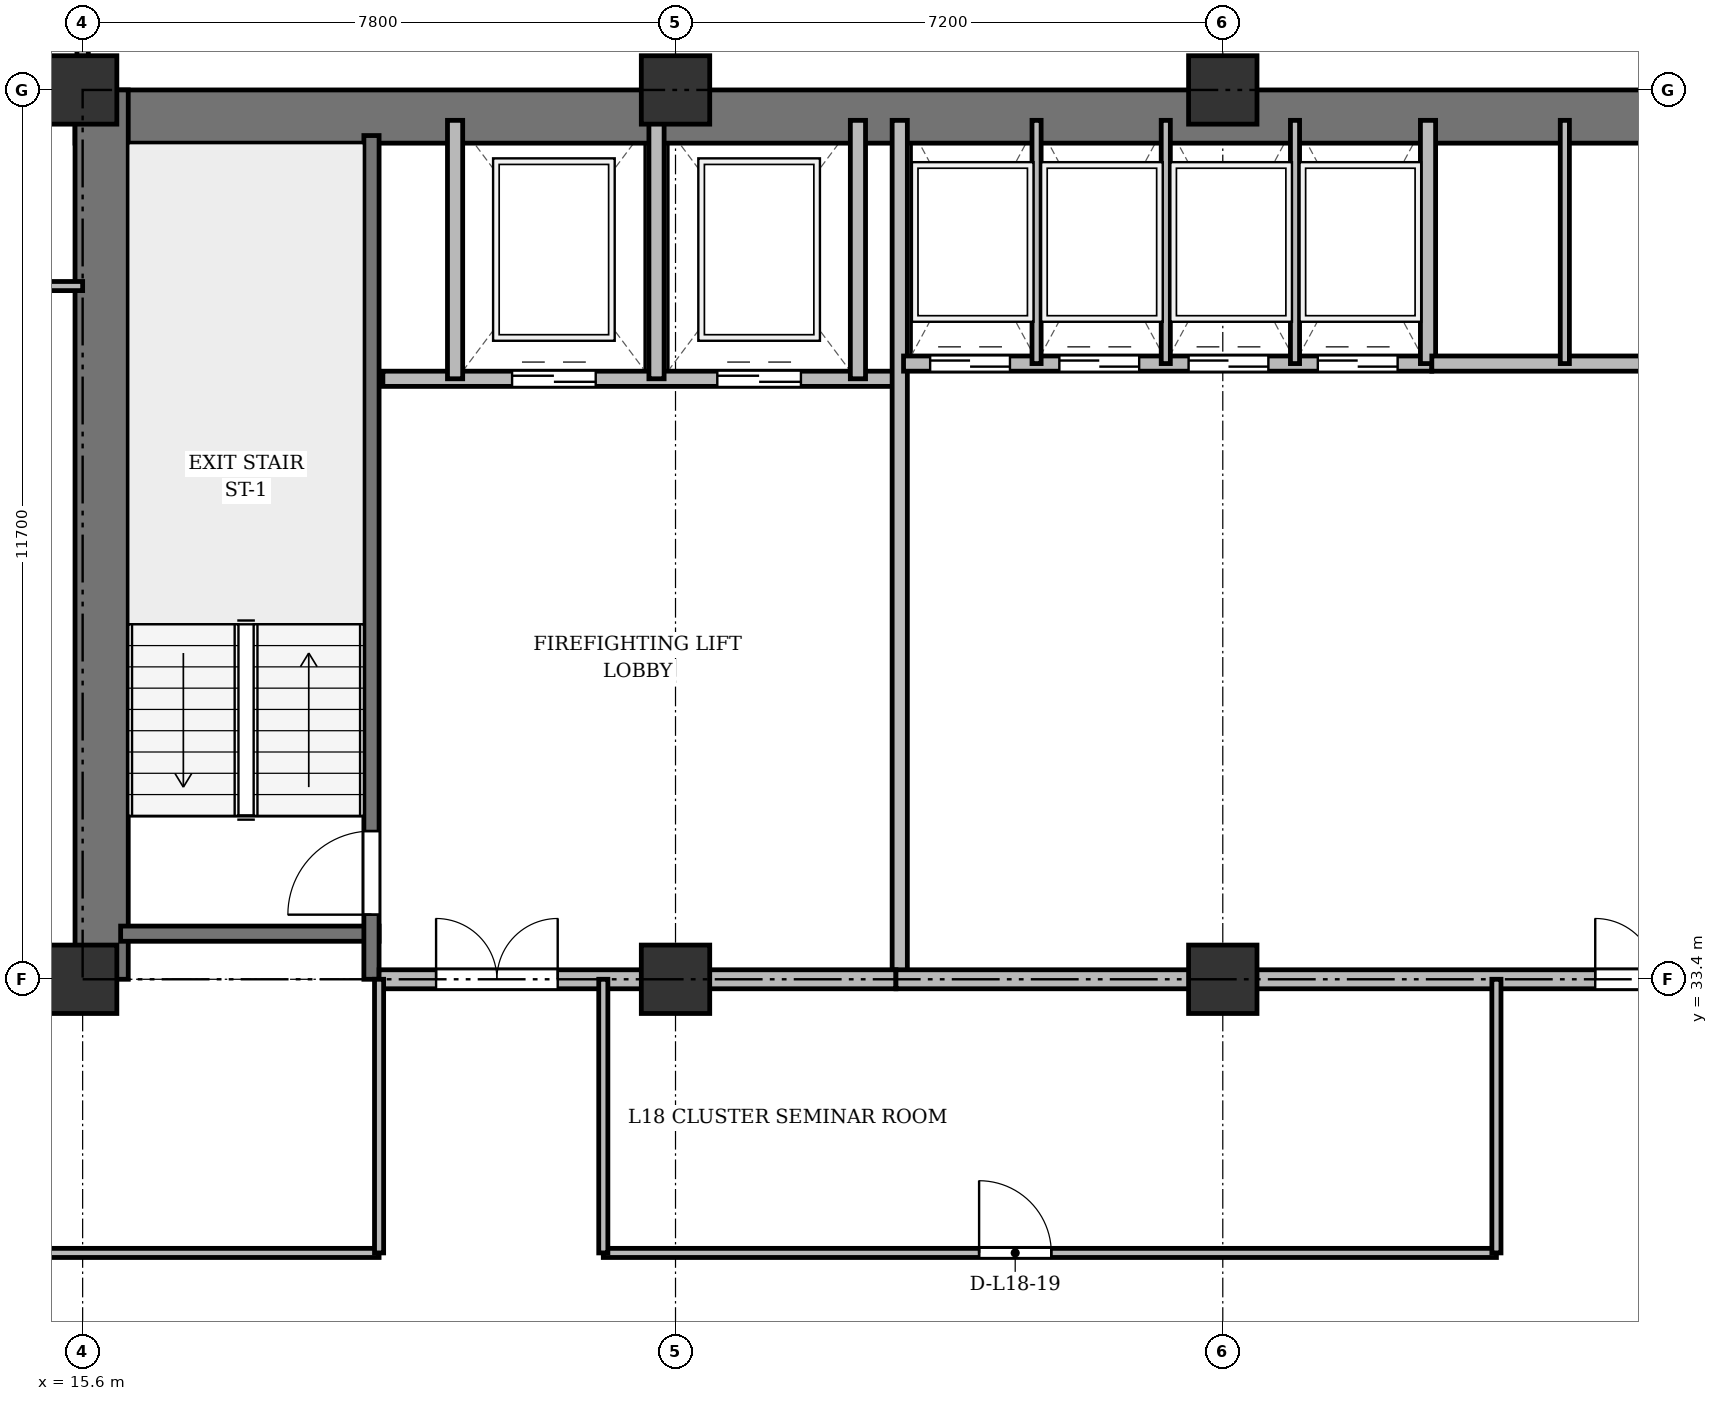
"""IFC4 building model, lengths in metres.
Left out: names, types, materials, properties, quantities, classifications, styles, units other than length and angle.
Written with IfcOpenShell. Run it as: python <this file> out.ifc"""

import sys

from ifc_helpers import new_model, si_unit, direction, frame, frame_2d, origin, origin_2d, place, context, subcontext, project, spatial, rectangle, extrude, source, transform, mapped, element, fill, save


model = new_model("IFC4")
c1 = context("Model", 3, precision=1e-05, world=origin(), true_north=direction((0.0, 1.0)))
c2 = subcontext(c1, "Body", "Model", "MODEL_VIEW")
j1 = project(units=[si_unit("LENGTHUNIT", "METRE"), si_unit("PLANEANGLEUNIT", "RADIAN")], contexts=[c1])
p1 = place(None, origin())
s1 = spatial("IfcSite", under=j1, at=p1, CompositionType="ELEMENT")
p2 = place(p1, origin())
s2 = spatial("IfcBuilding", under=s1, at=p2, CompositionType="ELEMENT")
p3 = place(p2, frame((0.0, 0.0, 70.3)))
s3 = spatial("IfcBuildingStorey", under=s2, at=p3, CompositionType="ELEMENT", Elevation=70.3)
m1 = source(origin(), c2, "Body", "SweptSolid", [
    extrude(rectangle(XDim=0.9, YDim=0.9, at=origin_2d()), origin(), (0.0, 0.0, 1.0), 3.6),
])
for number, where, z_axis, x_axis in (
    (1, (15.6, 33.4, 0.0), (0.0, 0.0, 1.0), (1.0, 0.0, 0.0)),
    (2, (15.6, 45.1, 0.0), (0.0, 0.0, 1.0), (1.0, 0.0, 0.0)),
    (3, (23.4, 33.4, 0.0), (0.0, 0.0, 1.0), (1.0, 0.0, 0.0)),
    (4, (23.4, 45.1, 0.0), (0.0, 0.0, 1.0), (1.0, 0.0, 0.0)),
    (5, (30.6, 33.4, 0.0), (0.0, 0.0, 1.0), (1.0, 0.0, 0.0)),
    (6, (30.6, 45.1, 0.0), (0.0, 0.0, 1.0), (1.0, 0.0, 0.0)),
):
    element("IfcColumn", number, at=place(p3, frame(where, z_axis=z_axis, x_axis=x_axis)), inside=s3, PredefinedType="COLUMN", context=c2, shape_type="MappedRepresentation", body=[
        mapped(m1, transform((0.0, 0.0, 0.0), x_axis=(1.0, 0.0, 0.0), y_axis=(0.0, 1.0, 0.0), z_axis=(0.0, 0.0, 1.0), scale=1.0)),
    ])
p4 = place(p3, frame((15.5, 44.75, 0.0), z_axis=(0.0, 0.0, 1.0), x_axis=(1.0, 0.0, 0.0)))
e7 = element("IfcWall", 7, at=p4, inside=s3, PredefinedType="SHEAR", context=c2, shape_type="SweptSolid", body=[
    extrude(rectangle(XDim=43.4, YDim=0.7, at=frame_2d((21.7, 0.0))), origin(), (0.0, 0.0, 1.0), 3.22),
])
p5 = place(p3, frame((15.85, 33.4, 0.0), z_axis=(0.0, 0.0, 1.0), x_axis=(0.0, 1.0, 0.0)))
e8 = element("IfcWall", 8, at=p5, inside=s3, PredefinedType="SHEAR", context=c2, shape_type="SweptSolid", body=[
    extrude(rectangle(XDim=11.7, YDim=0.7, at=frame_2d((5.85, 0.0))), origin(), (0.0, 0.0, 1.0), 3.22),
])
p6 = place(p3, frame((16.1, 34.0, 0.0), z_axis=(0.0, 0.0, 1.0), x_axis=(1.0, 0.0, 0.0)))
e9 = element("IfcWall", 9, at=p6, inside=s3, PredefinedType="SHEAR", context=c2, shape_type="SweptSolid", body=[
    extrude(rectangle(XDim=3.4, YDim=0.2, at=frame_2d((1.7, 0.0))), origin(), (0.0, 0.0, 1.0), 3.22),
])
p7 = place(p3, frame((19.4, 33.4, 0.0), z_axis=(0.0, 0.0, 1.0), x_axis=(0.0, 1.0, 0.0)))
e10 = element("IfcWall", 10, at=p7, inside=s3, PredefinedType="SHEAR", context=c2, shape_type="SweptSolid", body=[
    extrude(rectangle(XDim=11.1, YDim=0.2, at=frame_2d((5.55, 0.0))), origin(), (0.0, 0.0, 1.0), 3.22),
])
p8 = place(p7, frame((0.85, 0.0, 0.0)))
e11 = element("IfcOpeningElement", 11, at=p8, cuts=e10, PredefinedType="OPENING", context=c2, shape_type="SweptSolid", body=[
    extrude(rectangle(XDim=1.1, YDim=2.15, at=frame_2d((0.55, 1.075))), frame((0.0, 0.11, 0.0), z_axis=(0.0, -1.0, 0.0), x_axis=(1.0, 0.0, 0.0)), (0.0, 0.0, 1.0), 0.22),
])
p9 = place(p3, frame((19.55, 41.3, 0.0), z_axis=(0.0, 0.0, 1.0), x_axis=(1.0, 0.0, 0.0)))
e12 = element("IfcWall", 12, at=p9, inside=s3, PredefinedType="SOLIDWALL", context=c2, shape_type="SweptSolid", body=[
    extrude(rectangle(XDim=6.75, YDim=0.2, at=frame_2d((3.375, 0.0))), origin(), (0.0, 0.0, 1.0), 3.22),
])
p10 = place(p9, frame((1.7, 0.0, 0.0)))
e13 = element("IfcOpeningElement", 13, at=p10, cuts=e12, PredefinedType="OPENING", context=c2, shape_type="SweptSolid", body=[
    extrude(rectangle(XDim=1.1, YDim=2.15, at=frame_2d((0.55, 1.075))), frame((0.0, 0.11, 0.0), z_axis=(0.0, -1.0, 0.0), x_axis=(1.0, 0.0, 0.0)), (0.0, 0.0, 1.0), 0.22),
])
p11 = place(p9, frame((4.4, 0.0, 0.0)))
e14 = element("IfcOpeningElement", 14, at=p11, cuts=e12, PredefinedType="OPENING", context=c2, shape_type="SweptSolid", body=[
    extrude(rectangle(XDim=1.1, YDim=2.15, at=frame_2d((0.55, 1.075))), frame((0.0, 0.11, 0.0), z_axis=(0.0, -1.0, 0.0), x_axis=(1.0, 0.0, 0.0)), (0.0, 0.0, 1.0), 0.22),
])
for number, where, z_axis, x_axis in (
    (15, (20.5, 41.3, 0.0), (0.0, 0.0, 1.0), (0.0, 1.0, 0.0)),
    (16, (23.15, 41.3, 0.0), (0.0, 0.0, 1.0), (0.0, 1.0, 0.0)),
    (17, (25.8, 41.3, 0.0), (0.0, 0.0, 1.0), (0.0, 1.0, 0.0)),
):
    element("IfcWall", number, at=place(p3, frame(where, z_axis=z_axis, x_axis=x_axis)), inside=s3, PredefinedType="SOLIDWALL", context=c2, shape_type="SweptSolid", body=[
        extrude(rectangle(XDim=3.4, YDim=0.2, at=frame_2d((1.7, 0.0))), origin(), (0.0, 0.0, 1.0), 3.22),
    ])
p12 = place(p3, frame((26.35, 33.4, 0.0), z_axis=(0.0, 0.0, 1.0), x_axis=(0.0, 1.0, 0.0)))
e18 = element("IfcWall", 18, at=p12, inside=s3, PredefinedType="SOLIDWALL", context=c2, shape_type="SweptSolid", body=[
    extrude(rectangle(XDim=11.3, YDim=0.2, at=frame_2d((5.65, 0.0))), origin(), (0.0, 0.0, 1.0), 2.57),
])
p13 = place(p3, frame((19.5, 33.4, 0.0), z_axis=(0.0, 0.0, 1.0), x_axis=(1.0, 0.0, 0.0)))
e19 = element("IfcWall", 19, at=p13, inside=s3, PredefinedType="PARTITIONING", context=c2, shape_type="SweptSolid", body=[
    extrude(rectangle(XDim=6.8, YDim=0.25, at=frame_2d((3.4, 0.0))), origin(), (0.0, 0.0, 1.0), 2.57),
])
p14 = place(p13, frame((0.75, 0.0, 0.0)))
e20 = element("IfcOpeningElement", 20, at=p14, cuts=e19, PredefinedType="OPENING", context=c2, shape_type="SweptSolid", body=[
    extrude(rectangle(XDim=1.6, YDim=2.2, at=frame_2d((0.8, 1.1))), frame((0.0, 0.135, 0.0), z_axis=(0.0, -1.0, 0.0), x_axis=(1.0, 0.0, 0.0)), (0.0, 0.0, 1.0), 0.27),
])
p15 = place(p3, frame((26.4, 41.5, 0.0), z_axis=(0.0, 0.0, 1.0), x_axis=(1.0, 0.0, 0.0)))
e21 = element("IfcWall", 21, at=p15, inside=s3, PredefinedType="SOLIDWALL", context=c2, shape_type="SweptSolid", body=[
    extrude(rectangle(XDim=6.95, YDim=0.2, at=frame_2d((3.475, 0.0))), origin(), (0.0, 0.0, 1.0), 3.22),
])
p16 = place(p15, frame((0.35, 0.0, 0.0)))
e22 = element("IfcOpeningElement", 22, at=p16, cuts=e21, PredefinedType="OPENING", context=c2, shape_type="SweptSolid", body=[
    extrude(rectangle(XDim=1.05, YDim=2.15, at=frame_2d((0.525, 1.075))), frame((0.0, 0.11, 0.0), z_axis=(0.0, -1.0, 0.0), x_axis=(1.0, 0.0, 0.0)), (0.0, 0.0, 1.0), 0.22),
])
p17 = place(p15, frame((2.05, 0.0, 0.0)))
e23 = element("IfcOpeningElement", 23, at=p17, cuts=e21, PredefinedType="OPENING", context=c2, shape_type="SweptSolid", body=[
    extrude(rectangle(XDim=1.05, YDim=2.15, at=frame_2d((0.525, 1.075))), frame((0.0, 0.11, 0.0), z_axis=(0.0, -1.0, 0.0), x_axis=(1.0, 0.0, 0.0)), (0.0, 0.0, 1.0), 0.22),
])
p18 = place(p15, frame((3.75, 0.0, 0.0)))
e24 = element("IfcOpeningElement", 24, at=p18, cuts=e21, PredefinedType="OPENING", context=c2, shape_type="SweptSolid", body=[
    extrude(rectangle(XDim=1.05, YDim=2.15, at=frame_2d((0.525, 1.075))), frame((0.0, 0.11, 0.0), z_axis=(0.0, -1.0, 0.0), x_axis=(1.0, 0.0, 0.0)), (0.0, 0.0, 1.0), 0.22),
])
p19 = place(p15, frame((5.45, 0.0, 0.0)))
e25 = element("IfcOpeningElement", 25, at=p19, cuts=e21, PredefinedType="OPENING", context=c2, shape_type="SweptSolid", body=[
    extrude(rectangle(XDim=1.05, YDim=2.15, at=frame_2d((0.525, 1.075))), frame((0.0, 0.11, 0.0), z_axis=(0.0, -1.0, 0.0), x_axis=(1.0, 0.0, 0.0)), (0.0, 0.0, 1.0), 0.22),
])
p20 = place(p3, frame((33.3, 41.5, 0.0), z_axis=(0.0, 0.0, 1.0), x_axis=(0.0, 1.0, 0.0)))
e26 = element("IfcWall", 26, at=p20, inside=s3, PredefinedType="SOLIDWALL", context=c2, shape_type="SweptSolid", body=[
    extrude(rectangle(XDim=3.2, YDim=0.2, at=frame_2d((1.6, 0.0))), origin(), (0.0, 0.0, 1.0), 3.22),
])
for number, where, z_axis, x_axis in (
    (27, (28.15, 41.5, 0.0), (0.0, 0.0, 1.0), (0.0, 1.0, 0.0)),
    (28, (29.85, 41.5, 0.0), (0.0, 0.0, 1.0), (0.0, 1.0, 0.0)),
    (29, (31.55, 41.5, 0.0), (0.0, 0.0, 1.0), (0.0, 1.0, 0.0)),
):
    element("IfcWall", number, at=place(p3, frame(where, z_axis=z_axis, x_axis=x_axis)), inside=s3, PredefinedType="PARTITIONING", context=c2, shape_type="SweptSolid", body=[
        extrude(rectangle(XDim=3.2, YDim=0.12, at=frame_2d((1.6, 0.0))), origin(), (0.0, 0.0, 1.0), 3.22),
    ])
p21 = place(p3, frame((33.35, 41.5, 0.0), z_axis=(0.0, 0.0, 1.0), x_axis=(1.0, 0.0, 0.0)))
e30 = element("IfcWall", 30, at=p21, inside=s3, PredefinedType="SOLIDWALL", context=c2, shape_type="SweptSolid", body=[
    extrude(rectangle(XDim=6.9, YDim=0.2, at=frame_2d((3.45, 0.0))), origin(), (0.0, 0.0, 1.0), 3.22),
])
p22 = place(p3, frame((35.1, 41.5, 0.0), z_axis=(0.0, 0.0, 1.0), x_axis=(0.0, 1.0, 0.0)))
e31 = element("IfcWall", 31, at=p22, inside=s3, PredefinedType="PARTITIONING", context=c2, shape_type="SweptSolid", body=[
    extrude(rectangle(XDim=3.2, YDim=0.12, at=frame_2d((1.6, 0.0))), origin(), (0.0, 0.0, 1.0), 3.22),
])
p23 = place(p3, frame((26.3, 33.4, 0.0), z_axis=(0.0, 0.0, 1.0), x_axis=(1.0, 0.0, 0.0)))
e32 = element("IfcWall", 32, at=p23, inside=s3, PredefinedType="PARTITIONING", context=c2, shape_type="SweptSolid", body=[
    extrude(rectangle(XDim=20.85, YDim=0.25, at=frame_2d((10.425, 0.0))), origin(), (0.0, 0.0, 1.0), 2.57),
])
p24 = place(p23, frame((9.2, 0.0, 0.0)))
e33 = element("IfcOpeningElement", 33, at=p24, cuts=e32, PredefinedType="OPENING", context=c2, shape_type="SweptSolid", body=[
    extrude(rectangle(XDim=1.6, YDim=2.2, at=frame_2d((0.8, 1.1))), frame((0.0, 0.135, 0.0), z_axis=(0.0, -1.0, 0.0), x_axis=(1.0, 0.0, 0.0)), (0.0, 0.0, 1.0), 0.27),
])
p25 = place(p3, frame((4.75, 29.8, 0.0), z_axis=(0.0, 0.0, 1.0), x_axis=(1.0, 0.0, 0.0)))
e34 = element("IfcWall", 34, at=p25, inside=s3, PredefinedType="PARTITIONING", context=c2, shape_type="SweptSolid", body=[
    extrude(rectangle(XDim=14.75, YDim=0.12, at=frame_2d((7.375, 0.0))), origin(), (0.0, 0.0, 1.0), 2.632),
])
p26 = place(p25, frame((6.9, 0.0, 0.0)))
e35 = element("IfcOpeningElement", 35, at=p26, cuts=e34, PredefinedType="OPENING", context=c2, shape_type="SweptSolid", body=[
    extrude(rectangle(XDim=0.95, YDim=2.15, at=frame_2d((0.475, 1.075))), frame((0.0, 0.07, 0.0), z_axis=(0.0, -1.0, 0.0), x_axis=(1.0, 0.0, 0.0)), (0.0, 0.0, 1.0), 0.14),
])
p27 = place(p3, frame((22.45, 29.8, 0.0), z_axis=(0.0, 0.0, 1.0), x_axis=(1.0, 0.0, 0.0)))
e36 = element("IfcWall", 36, at=p27, inside=s3, PredefinedType="PARTITIONING", context=c2, shape_type="SweptSolid", body=[
    extrude(rectangle(XDim=11.75, YDim=0.12, at=frame_2d((5.875, 0.0))), origin(), (0.0, 0.0, 1.0), 2.632),
])
p28 = place(p27, frame((4.944, 0.0, 0.0)))
e37 = element("IfcOpeningElement", 37, at=p28, cuts=e36, PredefinedType="OPENING", context=c2, shape_type="SweptSolid", body=[
    extrude(rectangle(XDim=0.95, YDim=2.15, at=frame_2d((0.475, 1.075))), frame((0.0, 0.07, 0.0), z_axis=(0.0, -1.0, 0.0), x_axis=(1.0, 0.0, 0.0)), (0.0, 0.0, 1.0), 0.14),
])
for number, where, z_axis, x_axis in (
    (38, (19.5, 29.8, 0.0), (0.0, 0.0, 1.0), (0.0, 1.0, 0.0)),
    (39, (22.45, 29.8, 0.0), (0.0, 0.0, 1.0), (0.0, 1.0, 0.0)),
    (40, (34.2, 29.8, 0.0), (0.0, 0.0, 1.0), (0.0, 1.0, 0.0)),
):
    element("IfcWall", number, at=place(p3, frame(where, z_axis=z_axis, x_axis=x_axis)), inside=s3, PredefinedType="PARTITIONING", context=c2, shape_type="SweptSolid", body=[
        extrude(rectangle(XDim=3.6, YDim=0.12, at=frame_2d((1.8, 0.0))), origin(), (0.0, 0.0, 1.0), 2.57),
    ])
p29 = place(p3, frame((10.175, 42.52, 0.0), z_axis=(0.0, 0.0, 1.0), x_axis=(1.0, 0.0, 0.0)))
e41 = element("IfcWall", 41, at=p29, inside=s3, PredefinedType="PARTITIONING", context=c2, shape_type="SweptSolid", body=[
    extrude(rectangle(XDim=5.425, YDim=0.12, at=frame_2d((2.712, 0.0))), origin(), (0.0, 0.0, 1.0), 2.632),
])
p30 = place(p29, frame((2.052, 0.0, 0.0)))
e42 = element("IfcOpeningElement", 42, at=p30, cuts=e41, PredefinedType="OPENING", context=c2, shape_type="SweptSolid", body=[
    extrude(rectangle(XDim=0.95, YDim=2.15, at=frame_2d((0.475, 1.075))), frame((0.0, 0.07, 0.0), z_axis=(0.0, -1.0, 0.0), x_axis=(1.0, 0.0, 0.0)), (0.0, 0.0, 1.0), 0.14),
])
p31 = place(p3, frame((4.75, 33.4, 0.0), z_axis=(0.0, 0.0, 1.0), x_axis=(1.0, 0.0, 0.0)))
e43 = element("IfcWall", 43, at=p31, inside=s3, PredefinedType="PARTITIONING", context=c2, shape_type="SweptSolid", body=[
    extrude(rectangle(XDim=10.85, YDim=0.15, at=frame_2d((5.425, 0.0))), origin(), (0.0, 0.0, 1.0), 2.57),
])
p32 = place(p31, frame((6.025, 0.0, 0.0)))
e44 = element("IfcOpeningElement", 44, at=p32, cuts=e43, PredefinedType="OPENING", context=c2, shape_type="SweptSolid", body=[
    extrude(rectangle(XDim=0.95, YDim=2.15, at=frame_2d((0.475, 1.075))), frame((0.0, 0.085, 0.0), z_axis=(0.0, -1.0, 0.0), x_axis=(1.0, 0.0, 0.0)), (0.0, 0.0, 1.0), 0.17),
])
p33 = place(p3, frame((15.6, 44.75, 0.0), z_axis=(0.0, 0.0, 1.0), x_axis=(0.0, 1.0, 0.0)))
e45 = element("IfcWall", 45, at=p33, inside=s3, PredefinedType="PARTITIONING", context=c2, shape_type="SweptSolid", body=[
    extrude(rectangle(XDim=3.61, YDim=0.15, at=frame_2d((1.805, 0.0))), origin(), (0.0, 0.0, 1.0), 2.632),
])
p34 = place(p33, frame((1.1, 0.0, 0.0)))
e46 = element("IfcOpeningElement", 46, at=p34, cuts=e45, PredefinedType="OPENING", context=c2, shape_type="SweptSolid", body=[
    extrude(rectangle(XDim=0.95, YDim=2.15, at=frame_2d((0.475, 1.075))), frame((0.0, 0.085, 0.0), z_axis=(0.0, -1.0, 0.0), x_axis=(1.0, 0.0, 0.0)), (0.0, 0.0, 1.0), 0.17),
])
m2 = source(origin(), c2, "Body", "SweptSolid", [
    extrude(rectangle(XDim=1.1, YDim=2.15, at=frame_2d((0.55, 1.075))), frame((0.0, 0.025, 0.0), z_axis=(0.0, -1.0, 0.0), x_axis=(1.0, 0.0, 0.0)), (0.0, 0.0, 1.0), 0.05),
])
p35 = place(p8, origin())
e47 = element("IfcDoor", 47, at=p35, inside=s3, OperationType="SINGLE_SWING_LEFT", PredefinedType="DOOR", context=c2, shape_type="MappedRepresentation", body=[
    mapped(m2, transform((0.0, 0.0, 0.0), x_axis=(1.0, 0.0, 0.0), y_axis=(0.0, 1.0, 0.0), z_axis=(0.0, 0.0, 1.0), scale=1.0)),
])
fill(e11, e47)
p36 = place(p10, origin())
e48 = element("IfcDoor", 48, at=p36, inside=s3, OperationType="DOUBLE_DOOR_SLIDING", PredefinedType="DOOR", context=c2, shape_type="MappedRepresentation", body=[
    mapped(m2, transform((0.0, 0.0, 0.0), x_axis=(1.0, 0.0, 0.0), y_axis=(0.0, 1.0, 0.0), z_axis=(0.0, 0.0, 1.0), scale=1.0)),
])
fill(e13, e48)
p37 = place(p11, origin())
e49 = element("IfcDoor", 49, at=p37, inside=s3, OperationType="DOUBLE_DOOR_SLIDING", PredefinedType="DOOR", context=c2, shape_type="MappedRepresentation", body=[
    mapped(m2, transform((0.0, 0.0, 0.0), x_axis=(1.0, 0.0, 0.0), y_axis=(0.0, 1.0, 0.0), z_axis=(0.0, 0.0, 1.0), scale=1.0)),
])
fill(e14, e49)
m3 = source(origin(), c2, "Body", "SweptSolid", [
    extrude(rectangle(XDim=1.6, YDim=2.2, at=frame_2d((0.8, 1.1))), frame((0.0, 0.025, 0.0), z_axis=(0.0, -1.0, 0.0), x_axis=(1.0, 0.0, 0.0)), (0.0, 0.0, 1.0), 0.05),
])
p38 = place(p14, origin())
e50 = element("IfcDoor", 50, at=p38, inside=s3, OperationType="DOUBLE_DOOR_SINGLE_SWING", PredefinedType="DOOR", context=c2, shape_type="MappedRepresentation", body=[
    mapped(m3, transform((0.0, 0.0, 0.0), x_axis=(1.0, 0.0, 0.0), y_axis=(0.0, 1.0, 0.0), z_axis=(0.0, 0.0, 1.0), scale=1.0)),
])
fill(e20, e50)
m4 = source(origin(), c2, "Body", "SweptSolid", [
    extrude(rectangle(XDim=1.05, YDim=2.15, at=frame_2d((0.525, 1.075))), frame((0.0, 0.025, 0.0), z_axis=(0.0, -1.0, 0.0), x_axis=(1.0, 0.0, 0.0)), (0.0, 0.0, 1.0), 0.05),
])
p39 = place(p16, origin())
e51 = element("IfcDoor", 51, at=p39, inside=s3, OperationType="DOUBLE_DOOR_SLIDING", PredefinedType="DOOR", context=c2, shape_type="MappedRepresentation", body=[
    mapped(m4, transform((0.0, 0.0, 0.0), x_axis=(1.0, 0.0, 0.0), y_axis=(0.0, 1.0, 0.0), z_axis=(0.0, 0.0, 1.0), scale=1.0)),
])
fill(e22, e51)
p40 = place(p17, origin())
e52 = element("IfcDoor", 52, at=p40, inside=s3, OperationType="DOUBLE_DOOR_SLIDING", PredefinedType="DOOR", context=c2, shape_type="MappedRepresentation", body=[
    mapped(m4, transform((0.0, 0.0, 0.0), x_axis=(1.0, 0.0, 0.0), y_axis=(0.0, 1.0, 0.0), z_axis=(0.0, 0.0, 1.0), scale=1.0)),
])
fill(e23, e52)
p41 = place(p18, origin())
e53 = element("IfcDoor", 53, at=p41, inside=s3, OperationType="DOUBLE_DOOR_SLIDING", PredefinedType="DOOR", context=c2, shape_type="MappedRepresentation", body=[
    mapped(m4, transform((0.0, 0.0, 0.0), x_axis=(1.0, 0.0, 0.0), y_axis=(0.0, 1.0, 0.0), z_axis=(0.0, 0.0, 1.0), scale=1.0)),
])
fill(e24, e53)
p42 = place(p19, origin())
e54 = element("IfcDoor", 54, at=p42, inside=s3, OperationType="DOUBLE_DOOR_SLIDING", PredefinedType="DOOR", context=c2, shape_type="MappedRepresentation", body=[
    mapped(m4, transform((0.0, 0.0, 0.0), x_axis=(1.0, 0.0, 0.0), y_axis=(0.0, 1.0, 0.0), z_axis=(0.0, 0.0, 1.0), scale=1.0)),
])
fill(e25, e54)
p43 = place(p24, origin())
e55 = element("IfcDoor", 55, at=p43, inside=s3, OperationType="DOUBLE_DOOR_SINGLE_SWING", PredefinedType="DOOR", context=c2, shape_type="MappedRepresentation", body=[
    mapped(m3, transform((0.0, 0.0, 0.0), x_axis=(1.0, 0.0, 0.0), y_axis=(0.0, 1.0, 0.0), z_axis=(0.0, 0.0, 1.0), scale=1.0)),
])
fill(e33, e55)
m5 = source(origin(), c2, "Body", "SweptSolid", [
    extrude(rectangle(XDim=0.95, YDim=2.15, at=frame_2d((0.475, 1.075))), frame((0.0, 0.025, 0.0), z_axis=(0.0, -1.0, 0.0), x_axis=(1.0, 0.0, 0.0)), (0.0, 0.0, 1.0), 0.05),
])
p44 = place(p28, origin())
e56 = element("IfcDoor", 56, at=p44, inside=s3, OperationType="SINGLE_SWING_LEFT", PredefinedType="DOOR", context=c2, shape_type="MappedRepresentation", body=[
    mapped(m5, transform((0.0, 0.0, 0.0), x_axis=(1.0, 0.0, 0.0), y_axis=(0.0, 1.0, 0.0), z_axis=(0.0, 0.0, 1.0), scale=1.0)),
])
fill(e37, e56)
save(model, sys.argv[1])
